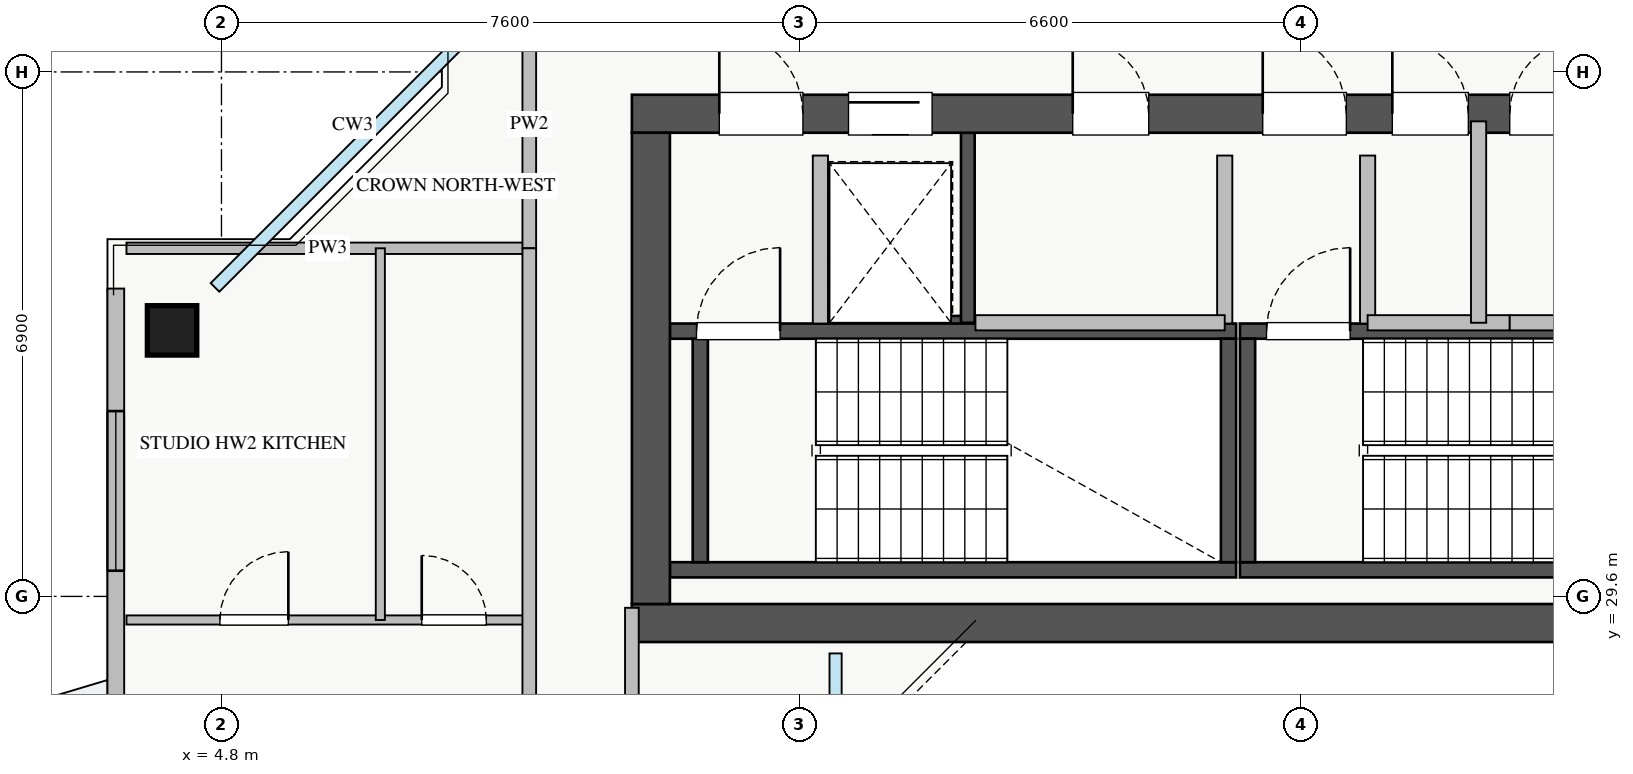
"""IFC4 building model, lengths in metres.
Left out: names, types, materials, properties, quantities, classifications, styles, units other than length and angle.
Written with IfcOpenShell. Run it as: python <this file> out.ifc"""

import sys

from ifc_helpers import new_model, si_unit, direction, frame, frame_2d, origin, origin_2d, place, context, subcontext, project, spatial, rectangle, extrude, source, transform, mapped, element, fill, save


model = new_model("IFC4")
c1 = context("Model", 3, precision=1e-05, world=origin(), true_north=direction((0.0, 1.0)))
c2 = subcontext(c1, "Body", "Model", "MODEL_VIEW")
j1 = project(units=[si_unit("LENGTHUNIT", "METRE"), si_unit("PLANEANGLEUNIT", "RADIAN")], contexts=[c1])
p1 = place(None, origin())
s1 = spatial("IfcSite", under=j1, at=p1, CompositionType="ELEMENT")
p2 = place(p1, origin())
s2 = spatial("IfcBuilding", under=s1, at=p2, CompositionType="ELEMENT")
p3 = place(p2, frame((0.0, 0.0, 253.5)))
s3 = spatial("IfcBuildingStorey", under=s2, at=p3, CompositionType="ELEMENT", Elevation=253.5)
p4 = place(p3, frame((12.68, 33.2, 0.0), z_axis=(0.0, 0.0, 1.0), x_axis=(1.0, 0.0, 0.0)))
e1 = element("IfcWall", 1, at=p4, inside=s3, PredefinedType="SHEAR", context=c2, shape_type="SweptSolid", body=[
    extrude(rectangle(XDim=1.94, YDim=0.18, at=frame_2d((0.97, 0.0))), origin(), (0.0, 0.0, 1.0), 3.07),
])
p5 = place(p3, frame((14.62, 33.2, 0.0), z_axis=(0.0, 0.0, 1.0), x_axis=(0.0, 1.0, 0.0)))
e2 = element("IfcWall", 2, at=p5, inside=s3, PredefinedType="SHEAR", context=c2, shape_type="SweptSolid", body=[
    extrude(rectangle(XDim=2.5, YDim=0.18, at=frame_2d((1.25, 0.0))), origin(), (0.0, 0.0, 1.0), 3.07),
])
p6 = place(p3, frame((10.7, 29.95, 0.0), z_axis=(0.0, 0.0, 1.0), x_axis=(1.0, 0.0, 0.0)))
e3 = element("IfcWall", 3, at=p6, inside=s3, PredefinedType="SHEAR", context=c2, shape_type="SweptSolid", body=[
    extrude(rectangle(XDim=7.45, YDim=0.2, at=frame_2d((3.725, 0.0))), origin(), (0.0, 0.0, 1.0), 3.25),
])
p7 = place(p3, frame((10.7, 33.09, 0.0), z_axis=(0.0, 0.0, 1.0), x_axis=(1.0, 0.0, 0.0)))
e4 = element("IfcWall", 4, at=p7, inside=s3, PredefinedType="SHEAR", context=c2, shape_type="SweptSolid", body=[
    extrude(rectangle(XDim=7.45, YDim=0.2, at=frame_2d((3.725, 0.0))), origin(), (0.0, 0.0, 1.0), 3.25),
])
p8 = place(p7, frame((0.35, 0.0, 0.0)))
e5 = element("IfcOpeningElement", 5, at=p8, cuts=e4, PredefinedType="OPENING", context=c2, shape_type="SweptSolid", body=[
    extrude(rectangle(XDim=1.1, YDim=2.05, at=frame_2d((0.55, 1.025))), frame((0.0, 0.11, 0.0), z_axis=(0.0, -1.0, 0.0), x_axis=(1.0, 0.0, 0.0)), (0.0, 0.0, 1.0), 0.22),
])
for number, where, z_axis, x_axis in (
    (6, (11.1, 30.05, 0.0), (0.0, 0.0, 1.0), (0.0, 1.0, 0.0)),
    (7, (18.05, 30.05, 0.0), (0.0, 0.0, 1.0), (0.0, 1.0, 0.0)),
):
    element("IfcWall", number, at=place(p3, frame(where, z_axis=z_axis, x_axis=x_axis)), inside=s3, PredefinedType="SHEAR", context=c2, shape_type="SweptSolid", body=[
        extrude(rectangle(XDim=2.94, YDim=0.2, at=frame_2d((1.47, 0.0))), origin(), (0.0, 0.0, 1.0), 3.25),
    ])
p9 = place(p3, frame((18.2, 29.95, 0.0), z_axis=(0.0, 0.0, 1.0), x_axis=(1.0, 0.0, 0.0)))
e8 = element("IfcWall", 8, at=p9, inside=s3, PredefinedType="SHEAR", context=c2, shape_type="SweptSolid", body=[
    extrude(rectangle(XDim=7.15, YDim=0.2, at=frame_2d((3.575, 0.0))), origin(), (0.0, 0.0, 1.0), 3.25),
])
p10 = place(p3, frame((18.2, 33.09, 0.0), z_axis=(0.0, 0.0, 1.0), x_axis=(1.0, 0.0, 0.0)))
e9 = element("IfcWall", 9, at=p10, inside=s3, PredefinedType="SHEAR", context=c2, shape_type="SweptSolid", body=[
    extrude(rectangle(XDim=7.15, YDim=0.2, at=frame_2d((3.575, 0.0))), origin(), (0.0, 0.0, 1.0), 3.25),
])
p11 = place(p10, frame((0.35, 0.0, 0.0)))
e10 = element("IfcOpeningElement", 10, at=p11, cuts=e9, PredefinedType="OPENING", context=c2, shape_type="SweptSolid", body=[
    extrude(rectangle(XDim=1.1, YDim=2.05, at=frame_2d((0.55, 1.025))), frame((0.0, 0.11, 0.0), z_axis=(0.0, -1.0, 0.0), x_axis=(1.0, 0.0, 0.0)), (0.0, 0.0, 1.0), 0.22),
])
p12 = place(p3, frame((18.3, 30.05, 0.0), z_axis=(0.0, 0.0, 1.0), x_axis=(0.0, 1.0, 0.0)))
e11 = element("IfcWall", 11, at=p12, inside=s3, PredefinedType="SHEAR", context=c2, shape_type="SweptSolid", body=[
    extrude(rectangle(XDim=2.94, YDim=0.2, at=frame_2d((1.47, 0.0))), origin(), (0.0, 0.0, 1.0), 3.25),
])
p13 = place(p3, frame((10.2, 29.25, 0.0), z_axis=(0.0, 0.0, 1.0), x_axis=(1.0, 0.0, 0.0)))
e12 = element("IfcWall", 12, at=p13, inside=s3, PredefinedType="SHEAR", context=c2, shape_type="SweptSolid", body=[
    extrude(rectangle(XDim=17.6, YDim=0.5, at=frame_2d((8.8, 0.0))), origin(), (0.0, 0.0, 1.0), 3.25),
])
p14 = place(p3, frame((10.2, 35.95, 0.0), z_axis=(0.0, 0.0, 1.0), x_axis=(1.0, 0.0, 0.0)))
e13 = element("IfcWall", 13, at=p14, inside=s3, PredefinedType="SHEAR", context=c2, shape_type="SweptSolid", body=[
    extrude(rectangle(XDim=17.6, YDim=0.5, at=frame_2d((8.8, 0.0))), origin(), (0.0, 0.0, 1.0), 3.25),
])
p15 = place(p14, frame((1.15, 0.0, 0.0)))
e14 = element("IfcOpeningElement", 14, at=p15, cuts=e13, PredefinedType="OPENING", context=c2, shape_type="SweptSolid", body=[
    extrude(rectangle(XDim=1.1, YDim=2.05, at=frame_2d((0.55, 1.025))), frame((0.0, 0.26, 0.0), z_axis=(0.0, -1.0, 0.0), x_axis=(1.0, 0.0, 0.0)), (0.0, 0.0, 1.0), 0.52),
])
p16 = place(p14, frame((8.3, 0.0, 0.0)))
e15 = element("IfcOpeningElement", 15, at=p16, cuts=e13, PredefinedType="OPENING", context=c2, shape_type="SweptSolid", body=[
    extrude(rectangle(XDim=1.1, YDim=2.05, at=frame_2d((0.55, 1.025))), frame((0.0, 0.26, 0.0), z_axis=(0.0, -1.0, 0.0), x_axis=(1.0, 0.0, 0.0)), (0.0, 0.0, 1.0), 0.52),
])
p17 = place(p14, frame((2.85, 0.0, 0.0)))
e16 = element("IfcOpeningElement", 16, at=p17, cuts=e13, PredefinedType="OPENING", context=c2, shape_type="SweptSolid", body=[
    extrude(rectangle(XDim=1.1, YDim=2.05, at=frame_2d((0.55, 1.025))), frame((0.0, 0.26, 0.0), z_axis=(0.0, -1.0, 0.0), x_axis=(1.0, 0.0, 0.0)), (0.0, 0.0, 1.0), 0.52),
])
p18 = place(p14, frame((5.8, 0.0, 0.0)))
e17 = element("IfcOpeningElement", 17, at=p18, cuts=e13, PredefinedType="OPENING", context=c2, shape_type="SweptSolid", body=[
    extrude(rectangle(XDim=1.0, YDim=2.05, at=frame_2d((0.5, 1.025))), frame((0.0, 0.26, 0.0), z_axis=(0.0, -1.0, 0.0), x_axis=(1.0, 0.0, 0.0)), (0.0, 0.0, 1.0), 0.52),
])
p19 = place(p14, frame((14.74, 0.0, 0.0)))
e18 = element("IfcOpeningElement", 18, at=p19, cuts=e13, PredefinedType="OPENING", context=c2, shape_type="SweptSolid", body=[
    extrude(rectangle(XDim=1.0, YDim=2.05, at=frame_2d((0.5, 1.025))), frame((0.0, 0.26, 0.0), z_axis=(0.0, -1.0, 0.0), x_axis=(1.0, 0.0, 0.0)), (0.0, 0.0, 1.0), 0.52),
])
p20 = place(p14, frame((10.005, 0.0, 0.0)))
e19 = element("IfcOpeningElement", 19, at=p20, cuts=e13, PredefinedType="OPENING", context=c2, shape_type="SweptSolid", body=[
    extrude(rectangle(XDim=1.0, YDim=2.05, at=frame_2d((0.5, 1.025))), frame((0.0, 0.26, 0.0), z_axis=(0.0, -1.0, 0.0), x_axis=(1.0, 0.0, 0.0)), (0.0, 0.0, 1.0), 0.52),
])
p21 = place(p14, frame((11.55, 0.0, 0.0)))
e20 = element("IfcOpeningElement", 20, at=p21, cuts=e13, PredefinedType="OPENING", context=c2, shape_type="SweptSolid", body=[
    extrude(rectangle(XDim=1.0, YDim=2.05, at=frame_2d((0.5, 1.025))), frame((0.0, 0.26, 0.0), z_axis=(0.0, -1.0, 0.0), x_axis=(1.0, 0.0, 0.0)), (0.0, 0.0, 1.0), 0.52),
])
p22 = place(p14, frame((13.215, 0.0, 0.0)))
e21 = element("IfcOpeningElement", 21, at=p22, cuts=e13, PredefinedType="OPENING", context=c2, shape_type="SweptSolid", body=[
    extrude(rectangle(XDim=1.0, YDim=2.05, at=frame_2d((0.5, 1.025))), frame((0.0, 0.26, 0.0), z_axis=(0.0, -1.0, 0.0), x_axis=(1.0, 0.0, 0.0)), (0.0, 0.0, 1.0), 0.52),
])
p23 = place(p3, frame((10.45, 29.5, 0.0), z_axis=(0.0, 0.0, 1.0), x_axis=(0.0, 1.0, 0.0)))
e22 = element("IfcWall", 22, at=p23, inside=s3, PredefinedType="SHEAR", context=c2, shape_type="SweptSolid", body=[
    extrude(rectangle(XDim=6.2, YDim=0.5, at=frame_2d((3.1, 0.0))), origin(), (0.0, 0.0, 1.0), 3.25),
])
m1 = source(origin(), c2, "Body", "SweptSolid", [
    extrude(rectangle(XDim=0.65, YDim=0.65, at=origin_2d()), origin(), (0.0, 0.0, 1.0), 3.25),
])
p24 = place(p3, frame((4.15, 33.1, 0.0), z_axis=(0.0, 0.0, 1.0), x_axis=(1.0, 0.0, 0.0)))
e23 = element("IfcColumn", 23, at=p24, inside=s3, PredefinedType="COLUMN", context=c2, shape_type="MappedRepresentation", body=[
    mapped(m1, transform((0.0, 0.0, 0.0), x_axis=(1.0, 0.0, 0.0), y_axis=(0.0, 1.0, 0.0), z_axis=(0.0, 0.0, 1.0), scale=1.0)),
])
p25 = place(p3, frame((3.41, 12.35, 0.0), z_axis=(0.0, 0.0, 1.0), x_axis=(0.0, 1.0, 0.0)))
e24 = element("IfcWall", 24, at=p25, inside=s3, PredefinedType="STANDARD", context=c2, shape_type="SweptSolid", body=[
    extrude(rectangle(XDim=21.3, YDim=0.22, at=frame_2d((10.65, 0.0))), origin(), (0.0, 0.0, 1.0), 2.61),
])
p26 = place(p25, frame((11.5, 0.0, 0.0)))
e25 = element("IfcOpeningElement", 25, at=p26, cuts=e24, PredefinedType="OPENING", context=c2, shape_type="SweptSolid", body=[
    extrude(rectangle(XDim=1.2, YDim=2.1, at=frame_2d((0.6, 1.05))), frame((0.0, 0.12, 0.0), z_axis=(0.0, -1.0, 0.0), x_axis=(1.0, 0.0, 0.0)), (0.0, 0.0, 1.0), 0.24),
])
p27 = place(p25, frame((1.463, 0.0, 0.9)))
e26 = element("IfcOpeningElement", 26, at=p27, cuts=e24, PredefinedType="OPENING", context=c2, shape_type="SweptSolid", body=[
    extrude(rectangle(XDim=2.4, YDim=1.48, at=frame_2d((1.2, 0.74))), frame((0.0, 0.12, 0.0), z_axis=(0.0, -1.0, 0.0), x_axis=(1.0, 0.0, 0.0)), (0.0, 0.0, 1.0), 0.24),
])
p28 = place(p25, frame((17.588, 0.0, 0.9)))
e27 = element("IfcOpeningElement", 27, at=p28, cuts=e24, PredefinedType="OPENING", context=c2, shape_type="SweptSolid", body=[
    extrude(rectangle(XDim=2.1, YDim=1.48, at=frame_2d((1.05, 0.74))), frame((0.0, 0.12, 0.0), z_axis=(0.0, -1.0, 0.0), x_axis=(1.0, 0.0, 0.0)), (0.0, 0.0, 1.0), 0.24),
])
p29 = place(p25, frame((12.92, 0.0, 0.9)))
e28 = element("IfcOpeningElement", 28, at=p29, cuts=e24, PredefinedType="OPENING", context=c2, shape_type="SweptSolid", body=[
    extrude(rectangle(XDim=0.9, YDim=1.2, at=frame_2d((0.45, 0.6))), frame((0.0, 0.12, 0.0), z_axis=(0.0, -1.0, 0.0), x_axis=(1.0, 0.0, 0.0)), (0.0, 0.0, 1.0), 0.24),
])
for number, where, z_axis, x_axis in (
    (29, (12.68, 33.19, 0.0), (0.0, 0.0, 1.0), (0.0, 1.0, 0.0)),
    (30, (18.0, 33.19, 0.0), (0.0, 0.0, 1.0), (0.0, 1.0, 0.0)),
    (31, (19.88, 33.19, 0.0), (0.0, 0.0, 1.0), (0.0, 1.0, 0.0)),
):
    element("IfcWall", number, at=place(p3, frame(where, z_axis=z_axis, x_axis=x_axis)), inside=s3, PredefinedType="PARTITIONING", context=c2, shape_type="SweptSolid", body=[
        extrude(rectangle(XDim=2.21, YDim=0.2, at=frame_2d((1.105, 0.0))), origin(), (0.0, 0.0, 1.0), 3.07),
    ])
p30 = place(p3, frame((14.72, 33.2, 0.0), z_axis=(0.0, 0.0, 1.0), x_axis=(1.0, 0.0, 0.0)))
e32 = element("IfcWall", 32, at=p30, inside=s3, PredefinedType="PARTITIONING", context=c2, shape_type="SweptSolid", body=[
    extrude(rectangle(XDim=3.28, YDim=0.2, at=frame_2d((1.64, 0.0))), origin(), (0.0, 0.0, 1.0), 3.07),
])
p31 = place(p3, frame((19.88, 33.2, 0.0), z_axis=(0.0, 0.0, 1.0), x_axis=(1.0, 0.0, 0.0)))
e33 = element("IfcWall", 33, at=p31, inside=s3, PredefinedType="PARTITIONING", context=c2, shape_type="SweptSolid", body=[
    extrude(rectangle(XDim=1.87, YDim=0.2, at=frame_2d((0.935, 0.0))), origin(), (0.0, 0.0, 1.0), 3.07),
])
p32 = place(p3, frame((21.34, 33.2, 0.0), z_axis=(0.0, 0.0, 1.0), x_axis=(0.0, 1.0, 0.0)))
e34 = element("IfcWall", 34, at=p32, inside=s3, PredefinedType="PARTITIONING", context=c2, shape_type="SweptSolid", body=[
    extrude(rectangle(XDim=2.65, YDim=0.2, at=frame_2d((1.325, 0.0))), origin(), (0.0, 0.0, 1.0), 3.07),
])
p33 = place(p3, frame((21.75, 33.2, 0.0), z_axis=(0.0, 0.0, 1.0), x_axis=(1.0, 0.0, 0.0)))
e35 = element("IfcWall", 35, at=p33, inside=s3, PredefinedType="PARTITIONING", context=c2, shape_type="SweptSolid", body=[
    extrude(rectangle(XDim=5.17, YDim=0.2, at=frame_2d((2.585, 0.0))), origin(), (0.0, 0.0, 1.0), 3.07),
])
p34 = place(p3, frame((3.55, 34.18, 0.0), z_axis=(0.0, 0.0, 1.0), x_axis=(1.0, 0.0, 0.0)))
e36 = element("IfcWall", 36, at=p34, inside=s3, PredefinedType="PARTITIONING", context=c2, shape_type="SweptSolid", body=[
    extrude(rectangle(XDim=5.3, YDim=0.15, at=frame_2d((2.65, 0.0))), origin(), (0.0, 0.0, 1.0), 3.07),
])
p35 = place(p3, frame((8.85, 34.18, 0.0), z_axis=(0.0, 0.0, 1.0), x_axis=(0.0, 1.0, 0.0)))
e37 = element("IfcWall", 37, at=p35, inside=s3, PredefinedType="PARTITIONING", context=c2, shape_type="SweptSolid", body=[
    extrude(rectangle(XDim=3.26, YDim=0.18, at=frame_2d((1.63, 0.0))), origin(), (0.0, 0.0, 1.0), 2.569),
])
p36 = place(p3, frame((3.55, 29.29, 0.0), z_axis=(0.0, 0.0, 1.0), x_axis=(1.0, 0.0, 0.0)))
e38 = element("IfcWall", 38, at=p36, inside=s3, PredefinedType="PLUMBINGWALL", context=c2, shape_type="SweptSolid", body=[
    extrude(rectangle(XDim=5.3, YDim=0.12, at=frame_2d((2.65, 0.0))), origin(), (0.0, 0.0, 1.0), 3.07),
])
p37 = place(p36, frame((1.23, 0.0, 0.0)))
e39 = element("IfcOpeningElement", 39, at=p37, cuts=e38, PredefinedType="OPENING", context=c2, shape_type="SweptSolid", body=[
    extrude(rectangle(XDim=0.9, YDim=2.05, at=frame_2d((0.45, 1.025))), frame((0.0, 0.07, 0.0), z_axis=(0.0, -1.0, 0.0), x_axis=(1.0, 0.0, 0.0)), (0.0, 0.0, 1.0), 0.14),
])
p38 = place(p36, frame((3.885, 0.0, 0.0)))
e40 = element("IfcOpeningElement", 40, at=p38, cuts=e38, PredefinedType="OPENING", context=c2, shape_type="SweptSolid", body=[
    extrude(rectangle(XDim=0.85, YDim=2.05, at=frame_2d((0.425, 1.025))), frame((0.0, 0.07, 0.0), z_axis=(0.0, -1.0, 0.0), x_axis=(1.0, 0.0, 0.0)), (0.0, 0.0, 1.0), 0.14),
])
p39 = place(p3, frame((6.89, 29.29, 0.0), z_axis=(0.0, 0.0, 1.0), x_axis=(0.0, 1.0, 0.0)))
e41 = element("IfcWall", 41, at=p39, inside=s3, PredefinedType="PLUMBINGWALL", context=c2, shape_type="SweptSolid", body=[
    extrude(rectangle(XDim=4.89, YDim=0.12, at=frame_2d((2.445, 0.0))), origin(), (0.0, 0.0, 1.0), 3.07),
])
p40 = place(p3, frame((8.85, 11.82, 0.0), z_axis=(0.0, 0.0, 1.0), x_axis=(0.0, 1.0, 0.0)))
e42 = element("IfcWall", 42, at=p40, inside=s3, PredefinedType="PARTITIONING", context=c2, shape_type="SweptSolid", body=[
    extrude(rectangle(XDim=22.36, YDim=0.18, at=frame_2d((11.18, 0.0))), origin(), (0.0, 0.0, 1.0), 2.569),
])
p41 = place(p40, frame((2.475, 0.0, 0.0)))
e43 = element("IfcOpeningElement", 43, at=p41, cuts=e42, PredefinedType="OPENING", context=c2, shape_type="SweptSolid", body=[
    extrude(rectangle(XDim=1.0, YDim=2.05, at=frame_2d((0.5, 1.025))), frame((0.0, 0.1, 0.0), z_axis=(0.0, -1.0, 0.0), x_axis=(1.0, 0.0, 0.0)), (0.0, 0.0, 1.0), 0.2),
])
p42 = place(p40, frame((13.91, 0.0, 0.0)))
e44 = element("IfcOpeningElement", 44, at=p42, cuts=e42, PredefinedType="OPENING", context=c2, shape_type="SweptSolid", body=[
    extrude(rectangle(XDim=1.0, YDim=2.05, at=frame_2d((0.5, 1.025))), frame((0.0, 0.1, 0.0), z_axis=(0.0, -1.0, 0.0), x_axis=(1.0, 0.0, 0.0)), (0.0, 0.0, 1.0), 0.2),
])
p43 = place(p3, frame((10.2, 16.55, 0.0), z_axis=(0.0, 0.0, 1.0), x_axis=(0.0, 1.0, 0.0)))
e45 = element("IfcWall", 45, at=p43, inside=s3, PredefinedType="PARTITIONING", context=c2, shape_type="SweptSolid", body=[
    extrude(rectangle(XDim=12.9, YDim=0.18, at=frame_2d((6.45, 0.0))), origin(), (0.0, 0.0, 1.0), 3.07),
])
p44 = place(p43, frame((3.425, 0.0, 0.0)))
e46 = element("IfcOpeningElement", 46, at=p44, cuts=e45, PredefinedType="OPENING", context=c2, shape_type="SweptSolid", body=[
    extrude(rectangle(XDim=0.85, YDim=2.05, at=frame_2d((0.425, 1.025))), frame((0.0, 0.1, 0.0), z_axis=(0.0, -1.0, 0.0), x_axis=(1.0, 0.0, 0.0)), (0.0, 0.0, 1.0), 0.2),
])
p45 = place(p43, frame((9.4, 0.0, 0.0)))
e47 = element("IfcOpeningElement", 47, at=p45, cuts=e45, PredefinedType="OPENING", context=c2, shape_type="SweptSolid", body=[
    extrude(rectangle(XDim=0.9, YDim=2.05, at=frame_2d((0.45, 1.025))), frame((0.0, 0.1, 0.0), z_axis=(0.0, -1.0, 0.0), x_axis=(1.0, 0.0, 0.0)), (0.0, 0.0, 1.0), 0.2),
])
m2 = source(origin(), c2, "Body", "SweptSolid", [
    extrude(rectangle(XDim=2.1, YDim=1.48, at=frame_2d((1.05, 0.74))), frame((0.0, 0.03, 0.0), z_axis=(0.0, -1.0, 0.0), x_axis=(1.0, 0.0, 0.0)), (0.0, 0.0, 1.0), 0.06),
])
p46 = place(p28, origin())
e48 = element("IfcWindow", 48, at=p46, inside=s3, PartitioningType="TRIPLE_PANEL_VERTICAL", PredefinedType="WINDOW", context=c2, shape_type="MappedRepresentation", body=[
    mapped(m2, transform((0.0, 0.0, 0.0), x_axis=(1.0, 0.0, 0.0), y_axis=(0.0, 1.0, 0.0), z_axis=(0.0, 0.0, 1.0), scale=1.0)),
])
fill(e27, e48)
m3 = source(origin(), c2, "Body", "SweptSolid", [
    extrude(rectangle(XDim=1.1, YDim=2.05, at=frame_2d((0.55, 1.025))), frame((0.0, 0.025, 0.0), z_axis=(0.0, -1.0, 0.0), x_axis=(1.0, 0.0, 0.0)), (0.0, 0.0, 1.0), 0.05),
])
p47 = place(p15, origin())
e49 = element("IfcDoor", 49, at=p47, inside=s3, OperationType="SINGLE_SWING_LEFT", PredefinedType="DOOR", context=c2, shape_type="MappedRepresentation", body=[
    mapped(m3, transform((0.0, 0.0, 0.0), x_axis=(1.0, 0.0, 0.0), y_axis=(0.0, 1.0, 0.0), z_axis=(0.0, 0.0, 1.0), scale=1.0)),
])
fill(e14, e49)
p48 = place(p8, origin())
e50 = element("IfcDoor", 50, at=p48, inside=s3, OperationType="SINGLE_SWING_RIGHT", PredefinedType="DOOR", context=c2, shape_type="MappedRepresentation", body=[
    mapped(m3, transform((0.0, 0.0, 0.0), x_axis=(1.0, 0.0, 0.0), y_axis=(0.0, 1.0, 0.0), z_axis=(0.0, 0.0, 1.0), scale=1.0)),
])
fill(e5, e50)
p49 = place(p16, origin())
e51 = element("IfcDoor", 51, at=p49, inside=s3, OperationType="SINGLE_SWING_LEFT", PredefinedType="DOOR", context=c2, shape_type="MappedRepresentation", body=[
    mapped(m3, transform((0.0, 0.0, 0.0), x_axis=(1.0, 0.0, 0.0), y_axis=(0.0, 1.0, 0.0), z_axis=(0.0, 0.0, 1.0), scale=1.0)),
])
fill(e15, e51)
p50 = place(p11, origin())
e52 = element("IfcDoor", 52, at=p50, inside=s3, OperationType="SINGLE_SWING_RIGHT", PredefinedType="DOOR", context=c2, shape_type="MappedRepresentation", body=[
    mapped(m3, transform((0.0, 0.0, 0.0), x_axis=(1.0, 0.0, 0.0), y_axis=(0.0, 1.0, 0.0), z_axis=(0.0, 0.0, 1.0), scale=1.0)),
])
fill(e10, e52)
p51 = place(p17, origin())
e53 = element("IfcDoor", 53, at=p51, inside=s3, OperationType="SLIDING_TO_LEFT", PredefinedType="DOOR", context=c2, shape_type="MappedRepresentation", body=[
    mapped(m3, transform((0.0, 0.0, 0.0), x_axis=(1.0, 0.0, 0.0), y_axis=(0.0, 1.0, 0.0), z_axis=(0.0, 0.0, 1.0), scale=1.0)),
])
fill(e16, e53)
m4 = source(origin(), c2, "Body", "SweptSolid", [
    extrude(rectangle(XDim=1.0, YDim=2.05, at=frame_2d((0.5, 1.025))), frame((0.0, 0.025, 0.0), z_axis=(0.0, -1.0, 0.0), x_axis=(1.0, 0.0, 0.0)), (0.0, 0.0, 1.0), 0.05),
])
p52 = place(p18, origin())
e54 = element("IfcDoor", 54, at=p52, inside=s3, OperationType="SINGLE_SWING_LEFT", PredefinedType="DOOR", context=c2, shape_type="MappedRepresentation", body=[
    mapped(m4, transform((0.0, 0.0, 0.0), x_axis=(1.0, 0.0, 0.0), y_axis=(0.0, 1.0, 0.0), z_axis=(0.0, 0.0, 1.0), scale=1.0)),
])
fill(e17, e54)
p53 = place(p20, origin())
e55 = element("IfcDoor", 55, at=p53, inside=s3, OperationType="SINGLE_SWING_LEFT", PredefinedType="DOOR", context=c2, shape_type="MappedRepresentation", body=[
    mapped(m4, transform((0.0, 0.0, 0.0), x_axis=(1.0, 0.0, 0.0), y_axis=(0.0, 1.0, 0.0), z_axis=(0.0, 0.0, 1.0), scale=1.0)),
])
fill(e19, e55)
p54 = place(p21, origin())
e56 = element("IfcDoor", 56, at=p54, inside=s3, OperationType="SINGLE_SWING_RIGHT", PredefinedType="DOOR", context=c2, shape_type="MappedRepresentation", body=[
    mapped(m4, transform((0.0, 0.0, 0.0), x_axis=(1.0, 0.0, 0.0), y_axis=(0.0, 1.0, 0.0), z_axis=(0.0, 0.0, 1.0), scale=1.0)),
])
fill(e20, e56)
m5 = source(origin(), c2, "Body", "SweptSolid", [
    extrude(rectangle(XDim=0.9, YDim=2.05, at=frame_2d((0.45, 1.025))), frame((0.0, 0.025, 0.0), z_axis=(0.0, -1.0, 0.0), x_axis=(1.0, 0.0, 0.0)), (0.0, 0.0, 1.0), 0.05),
])
p55 = place(p37, origin())
e57 = element("IfcDoor", 57, at=p55, inside=s3, OperationType="SINGLE_SWING_RIGHT", PredefinedType="DOOR", context=c2, shape_type="MappedRepresentation", body=[
    mapped(m5, transform((0.0, 0.0, 0.0), x_axis=(1.0, 0.0, 0.0), y_axis=(0.0, 1.0, 0.0), z_axis=(0.0, 0.0, 1.0), scale=1.0)),
])
fill(e39, e57)
m6 = source(origin(), c2, "Body", "SweptSolid", [
    extrude(rectangle(XDim=0.85, YDim=2.05, at=frame_2d((0.425, 1.025))), frame((0.0, 0.025, 0.0), z_axis=(0.0, -1.0, 0.0), x_axis=(1.0, 0.0, 0.0)), (0.0, 0.0, 1.0), 0.05),
])
p56 = place(p38, origin())
e58 = element("IfcDoor", 58, at=p56, inside=s3, OperationType="SINGLE_SWING_LEFT", PredefinedType="DOOR", context=c2, shape_type="MappedRepresentation", body=[
    mapped(m6, transform((0.0, 0.0, 0.0), x_axis=(1.0, 0.0, 0.0), y_axis=(0.0, 1.0, 0.0), z_axis=(0.0, 0.0, 1.0), scale=1.0)),
])
fill(e40, e58)
save(model, sys.argv[1])
